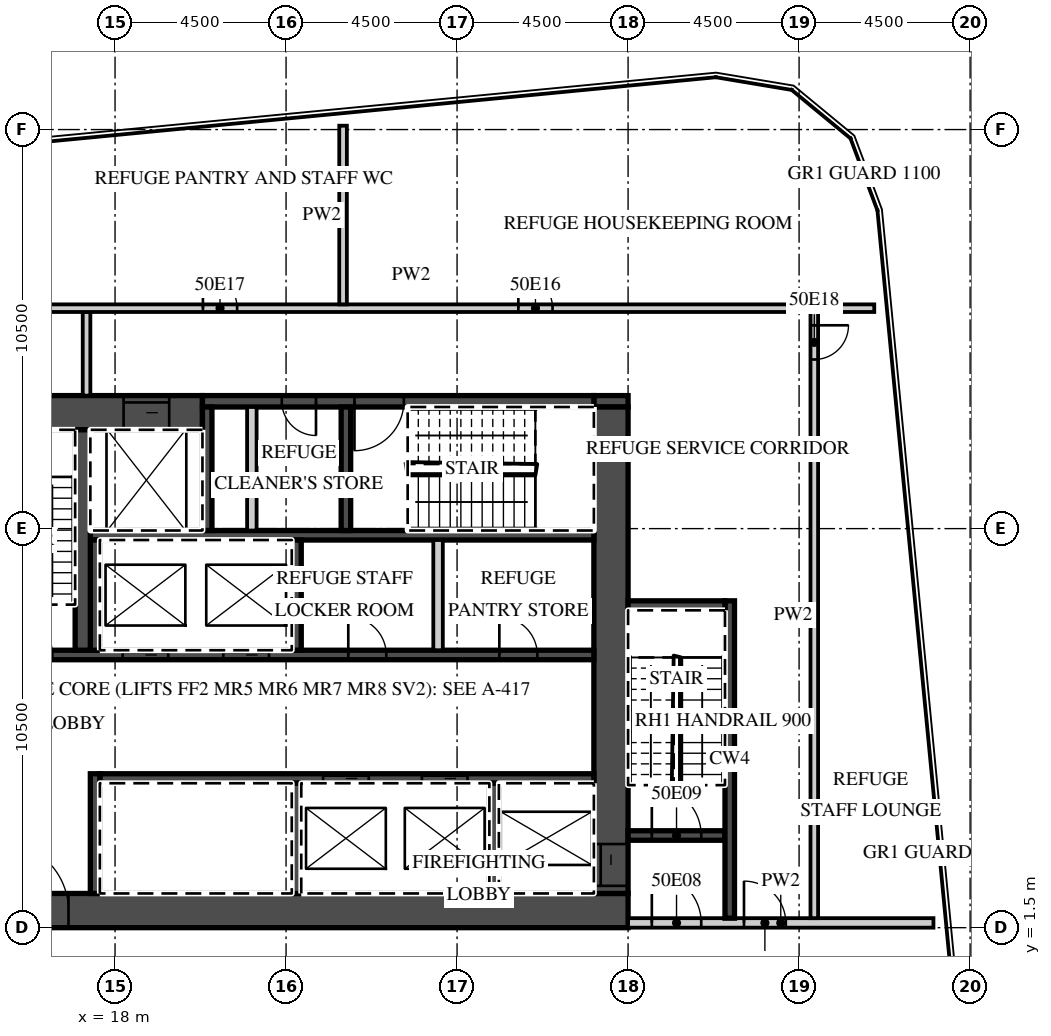
"""IFC4 building model, lengths in metres.
Left out: names, types, materials, properties, quantities, classifications, styles, units other than length and angle.
Written with IfcOpenShell. Run it as: python <this file> out.ifc"""

import sys

from ifc_helpers import new_model, si_unit, direction, frame, frame_2d, origin, place, context, subcontext, project, spatial, rectangle, extrude, element, fill, save


model = new_model("IFC4")
c1 = context("Model", 3, precision=1e-05, world=origin(), true_north=direction((0.0, 1.0)))
c2 = subcontext(c1, "Body", "Model", "MODEL_VIEW")
j1 = project(units=[si_unit("LENGTHUNIT", "METRE"), si_unit("PLANEANGLEUNIT", "RADIAN")], contexts=[c1])
p1 = place(None, origin())
s1 = spatial("IfcSite", under=j1, at=p1, CompositionType="ELEMENT")
p2 = place(p1, origin())
s2 = spatial("IfcBuilding", under=s1, at=p2, CompositionType="ELEMENT")
p3 = place(p2, frame((0.0, 0.0, 206.5)))
s3 = spatial("IfcBuildingStorey", under=s2, at=p3, CompositionType="ELEMENT", Elevation=206.5)
p4 = place(p3, frame((13.5, 1.95, 0.0), z_axis=(0.0, 0.0, 1.0), x_axis=(1.0, 0.0, 0.0)))
e1 = element("IfcWall", 1, at=p4, inside=s3, PredefinedType="SHEAR", context=c2, shape_type="SweptSolid", body=[
    extrude(rectangle(XDim=18.0, YDim=0.9, at=frame_2d((9.0, 0.0))), origin(), (0.0, 0.0, 1.0), 4.2),
])
p5 = place(p4, frame((1.475, 0.0, 0.0)))
e2 = element("IfcOpeningElement", 2, at=p5, cuts=e1, PredefinedType="OPENING", context=c2, shape_type="SweptSolid", body=[
    extrude(rectangle(XDim=1.8, YDim=2.1, at=frame_2d((0.9, 1.05))), frame((0.0, 0.46, 0.0), z_axis=(0.0, -1.0, 0.0), x_axis=(1.0, 0.0, 0.0)), (0.0, 0.0, 1.0), 0.92),
])
p6 = place(p3, frame((13.5, 15.05, 0.0), z_axis=(0.0, 0.0, 1.0), x_axis=(1.0, 0.0, 0.0)))
e3 = element("IfcWall", 3, at=p6, inside=s3, PredefinedType="SHEAR", context=c2, shape_type="SweptSolid", body=[
    extrude(rectangle(XDim=6.8, YDim=0.9, at=frame_2d((3.4, 0.0))), origin(), (0.0, 0.0, 1.0), 4.2),
])
p7 = place(p6, frame((4.725, 0.0, 0.0)))
e4 = element("IfcOpeningElement", 4, at=p7, cuts=e3, PredefinedType="OPENING", context=c2, shape_type="SweptSolid", body=[
    extrude(rectangle(XDim=1.2, YDim=2.1, at=frame_2d((0.6, 1.05))), frame((0.0, 0.46, 0.0), z_axis=(0.0, -1.0, 0.0), x_axis=(1.0, 0.0, 0.0)), (0.0, 0.0, 1.0), 0.92),
])
p8 = place(p3, frame((30.6, 15.35, 0.0), z_axis=(0.0, 0.0, 1.0), x_axis=(1.0, 0.0, 0.0)))
e5 = element("IfcWall", 5, at=p8, inside=s3, PredefinedType="SHEAR", context=c2, shape_type="SweptSolid", body=[
    extrude(rectangle(XDim=0.9, YDim=0.3, at=frame_2d((0.45, 0.0))), origin(), (0.0, 0.0, 1.0), 4.2),
])
p9 = place(p3, frame((20.3, 15.35, 0.0), z_axis=(0.0, 0.0, 1.0), x_axis=(1.0, 0.0, 0.0)))
e6 = element("IfcWall", 6, at=p9, inside=s3, PredefinedType="SHEAR", context=c2, shape_type="SweptSolid", body=[
    extrude(rectangle(XDim=10.3, YDim=0.3, at=frame_2d((5.15, 0.0))), origin(), (0.0, 0.0, 1.0), 4.2),
])
p10 = place(p9, frame((4.0, 0.0, 0.0)))
e7 = element("IfcOpeningElement", 7, at=p10, cuts=e6, PredefinedType="OPENING", context=c2, shape_type="SweptSolid", body=[
    extrude(rectangle(XDim=1.3, YDim=2.1, at=frame_2d((0.65, 1.05))), frame((0.0, 0.16, 0.0), z_axis=(0.0, -1.0, 0.0), x_axis=(1.0, 0.0, 0.0)), (0.0, 0.0, 1.0), 0.32),
])
p11 = place(p9, frame((2.087, 0.0, 0.0)))
e8 = element("IfcOpeningElement", 8, at=p11, cuts=e6, PredefinedType="OPENING", context=c2, shape_type="SweptSolid", body=[
    extrude(rectangle(XDim=0.9, YDim=2.1, at=frame_2d((0.45, 1.05))), frame((0.0, 0.16, 0.0), z_axis=(0.0, -1.0, 0.0), x_axis=(1.0, 0.0, 0.0)), (0.0, 0.0, 1.0), 0.32),
])
p12 = place(p3, frame((31.05, 2.4, 0.0), z_axis=(0.0, 0.0, 1.0), x_axis=(0.0, 1.0, 0.0)))
e9 = element("IfcWall", 9, at=p12, inside=s3, PredefinedType="SHEAR", context=c2, shape_type="SweptSolid", body=[
    extrude(rectangle(XDim=12.8, YDim=0.9, at=frame_2d((6.4, 0.0))), origin(), (0.0, 0.0, 1.0), 4.2),
])
p13 = place(p12, frame((0.2, 0.0, 0.0)))
e10 = element("IfcOpeningElement", 10, at=p13, cuts=e9, PredefinedType="OPENING", context=c2, shape_type="SweptSolid", body=[
    extrude(rectangle(XDim=1.1, YDim=2.1, at=frame_2d((0.55, 1.05))), frame((0.0, 0.46, 0.0), z_axis=(0.0, -1.0, 0.0), x_axis=(1.0, 0.0, 0.0)), (0.0, 0.0, 1.0), 0.92),
])
p14 = place(p3, frame((17.6, 5.425, 0.0), z_axis=(0.0, 0.0, 1.0), x_axis=(1.0, 0.0, 0.0)))
e11 = element("IfcWall", 11, at=p14, inside=s3, PredefinedType="SHEAR", context=c2, shape_type="SweptSolid", body=[
    extrude(rectangle(XDim=13.0, YDim=0.25, at=frame_2d((6.5, 0.0))), origin(), (0.0, 0.0, 1.0), 4.2),
])
p15 = place(p14, frame((8.475, 0.0, 0.0)))
e12 = element("IfcOpeningElement", 12, at=p15, cuts=e11, PredefinedType="OPENING", context=c2, shape_type="SweptSolid", body=[
    extrude(rectangle(XDim=1.2, YDim=2.1, at=frame_2d((0.6, 1.05))), frame((0.0, 0.135, 0.0), z_axis=(0.0, -1.0, 0.0), x_axis=(1.0, 0.0, 0.0)), (0.0, 0.0, 1.0), 0.27),
])
p16 = place(p14, frame((5.875, 0.0, 0.0)))
e13 = element("IfcOpeningElement", 13, at=p16, cuts=e11, PredefinedType="OPENING", context=c2, shape_type="SweptSolid", body=[
    extrude(rectangle(XDim=1.2, YDim=2.1, at=frame_2d((0.6, 1.05))), frame((0.0, 0.135, 0.0), z_axis=(0.0, -1.0, 0.0), x_axis=(1.0, 0.0, 0.0)), (0.0, 0.0, 1.0), 0.27),
])
p17 = place(p3, frame((17.475, 2.4, 0.0), z_axis=(0.0, 0.0, 1.0), x_axis=(0.0, 1.0, 0.0)))
e14 = element("IfcWall", 14, at=p17, inside=s3, PredefinedType="SHEAR", context=c2, shape_type="SweptSolid", body=[
    extrude(rectangle(XDim=3.15, YDim=0.25, at=frame_2d((1.575, 0.0))), origin(), (0.0, 0.0, 1.0), 4.2),
])
for number, where, z_axis, x_axis in (
    (15, (27.975, 2.4, 0.0), (0.0, 0.0, 1.0), (0.0, 1.0, 0.0)),
    (16, (22.775, 2.4, 0.0), (0.0, 0.0, 1.0), (0.0, 1.0, 0.0)),
):
    element("IfcWall", number, at=place(p3, frame(where, z_axis=z_axis, x_axis=x_axis)), inside=s3, PredefinedType="SHEAR", context=c2, shape_type="SweptSolid", body=[
        extrude(rectangle(XDim=2.9, YDim=0.25, at=frame_2d((1.45, 0.0))), origin(), (0.0, 0.0, 1.0), 4.2),
    ])
p18 = place(p3, frame((14.4, 8.675, 0.0), z_axis=(0.0, 0.0, 1.0), x_axis=(1.0, 0.0, 0.0)))
e17 = element("IfcWall", 17, at=p18, inside=s3, PredefinedType="SHEAR", context=c2, shape_type="SweptSolid", body=[
    extrude(rectangle(XDim=16.2, YDim=0.25, at=frame_2d((8.1, 0.0))), origin(), (0.0, 0.0, 1.0), 4.2),
])
p19 = place(p18, frame((6.45, 0.0, 0.0)))
e18 = element("IfcOpeningElement", 18, at=p19, cuts=e17, PredefinedType="OPENING", context=c2, shape_type="SweptSolid", body=[
    extrude(rectangle(XDim=1.2, YDim=2.1, at=frame_2d((0.6, 1.05))), frame((0.0, 0.135, 0.0), z_axis=(0.0, -1.0, 0.0), x_axis=(1.0, 0.0, 0.0)), (0.0, 0.0, 1.0), 0.27),
])
p20 = place(p18, frame((3.8, 0.0, 0.0)))
e19 = element("IfcOpeningElement", 19, at=p20, cuts=e17, PredefinedType="OPENING", context=c2, shape_type="SweptSolid", body=[
    extrude(rectangle(XDim=1.2, YDim=2.1, at=frame_2d((0.6, 1.05))), frame((0.0, 0.135, 0.0), z_axis=(0.0, -1.0, 0.0), x_axis=(1.0, 0.0, 0.0)), (0.0, 0.0, 1.0), 0.27),
])
p21 = place(p18, frame((0.65, 0.0, 0.0)))
e20 = element("IfcOpeningElement", 20, at=p21, cuts=e17, PredefinedType="OPENING", context=c2, shape_type="SweptSolid", body=[
    extrude(rectangle(XDim=1.3, YDim=2.1, at=frame_2d((0.65, 1.05))), frame((0.0, 0.135, 0.0), z_axis=(0.0, -1.0, 0.0), x_axis=(1.0, 0.0, 0.0)), (0.0, 0.0, 1.0), 0.27),
])
p22 = place(p18, frame((13.712, 0.0, 0.0)))
e21 = element("IfcOpeningElement", 21, at=p22, cuts=e17, PredefinedType="OPENING", context=c2, shape_type="SweptSolid", body=[
    extrude(rectangle(XDim=1.0, YDim=2.1, at=frame_2d((0.5, 1.05))), frame((0.0, 0.135, 0.0), z_axis=(0.0, -1.0, 0.0), x_axis=(1.0, 0.0, 0.0)), (0.0, 0.0, 1.0), 0.27),
])
p23 = place(p18, frame((9.738, 0.0, 0.0)))
e22 = element("IfcOpeningElement", 22, at=p23, cuts=e17, PredefinedType="OPENING", context=c2, shape_type="SweptSolid", body=[
    extrude(rectangle(XDim=1.0, YDim=2.1, at=frame_2d((0.5, 1.05))), frame((0.0, 0.135, 0.0), z_axis=(0.0, -1.0, 0.0), x_axis=(1.0, 0.0, 0.0)), (0.0, 0.0, 1.0), 0.27),
])
p24 = place(p3, frame((17.35, 11.825, 0.0), z_axis=(0.0, 0.0, 1.0), x_axis=(1.0, 0.0, 0.0)))
e23 = element("IfcWall", 23, at=p24, inside=s3, PredefinedType="SHEAR", context=c2, shape_type="SweptSolid", body=[
    extrude(rectangle(XDim=13.25, YDim=0.25, at=frame_2d((6.625, 0.0))), origin(), (0.0, 0.0, 1.0), 4.2),
])
for number, where, z_axis, x_axis in (
    (24, (17.475, 8.8, 0.0), (0.0, 0.0, 1.0), (0.0, 1.0, 0.0)),
    (25, (22.775, 8.8, 0.0), (0.0, 0.0, 1.0), (0.0, 1.0, 0.0)),
):
    element("IfcWall", number, at=place(p3, frame(where, z_axis=z_axis, x_axis=x_axis)), inside=s3, PredefinedType="SHEAR", context=c2, shape_type="SweptSolid", body=[
        extrude(rectangle(XDim=2.9, YDim=0.25, at=frame_2d((1.45, 0.0))), origin(), (0.0, 0.0, 1.0), 4.2),
    ])
p25 = place(p3, frame((26.5, 8.8, 0.0), z_axis=(0.0, 0.0, 1.0), x_axis=(0.0, 1.0, 0.0)))
e26 = element("IfcWall", 26, at=p25, inside=s3, PredefinedType="PARTITIONING", context=c2, shape_type="SweptSolid", body=[
    extrude(rectangle(XDim=2.9, YDim=0.25, at=frame_2d((1.45, 0.0))), origin(), (0.0, 0.0, 1.0), 4.2),
])
p26 = place(p3, frame((17.15, 8.8, 0.0), z_axis=(0.0, 0.0, 1.0), x_axis=(0.0, 1.0, 0.0)))
e27 = element("IfcWall", 27, at=p26, inside=s3, PredefinedType="SHEAR", context=c2, shape_type="SweptSolid", body=[
    extrude(rectangle(XDim=5.8, YDim=0.4, at=frame_2d((2.9, 0.0))), origin(), (0.0, 0.0, 1.0), 4.2),
])
for number, where, z_axis, x_axis in (
    (28, (20.425, 11.95, 0.0), (0.0, 0.0, 1.0), (0.0, 1.0, 0.0)),
    (29, (24.075, 11.95, 0.0), (0.0, 0.0, 1.0), (0.0, 1.0, 0.0)),
):
    element("IfcWall", number, at=place(p3, frame(where, z_axis=z_axis, x_axis=x_axis)), inside=s3, PredefinedType="SHEAR", context=c2, shape_type="SweptSolid", body=[
        extrude(rectangle(XDim=3.25, YDim=0.25, at=frame_2d((1.625, 0.0))), origin(), (0.0, 0.0, 1.0), 4.2),
    ])
p27 = place(p3, frame((21.6, 11.95, 0.0), z_axis=(0.0, 0.0, 1.0), x_axis=(0.0, 1.0, 0.0)))
e30 = element("IfcWall", 30, at=p27, inside=s3, PredefinedType="PARTITIONING", context=c2, shape_type="SweptSolid", body=[
    extrude(rectangle(XDim=3.25, YDim=0.25, at=frame_2d((1.625, 0.0))), origin(), (0.0, 0.0, 1.0), 4.2),
])
p28 = place(p3, frame((31.5, 1.625, 0.0), z_axis=(0.0, 0.0, 1.0), x_axis=(1.0, 0.0, 0.0)))
e31 = element("IfcWall", 31, at=p28, inside=s3, PredefinedType="PARTITIONING", context=c2, shape_type="SweptSolid", body=[
    extrude(rectangle(XDim=8.035, YDim=0.25, at=frame_2d((4.018, 0.0))), origin(), (0.0, 0.0, 1.0), 4.2),
])
p29 = place(p28, frame((0.625, 0.0, 0.0)))
e32 = element("IfcOpeningElement", 32, at=p29, cuts=e31, PredefinedType="OPENING", context=c2, shape_type="SweptSolid", body=[
    extrude(rectangle(XDim=1.3, YDim=2.1, at=frame_2d((0.65, 1.05))), frame((0.0, 0.135, 0.0), z_axis=(0.0, -1.0, 0.0), x_axis=(1.0, 0.0, 0.0)), (0.0, 0.0, 1.0), 0.27),
])
p30 = place(p28, frame((3.05, 0.0, 0.0)))
e33 = element("IfcOpeningElement", 33, at=p30, cuts=e31, PredefinedType="OPENING", context=c2, shape_type="SweptSolid", body=[
    extrude(rectangle(XDim=1.1, YDim=2.1, at=frame_2d((0.55, 1.05))), frame((0.0, 0.135, 0.0), z_axis=(0.0, -1.0, 0.0), x_axis=(1.0, 0.0, 0.0)), (0.0, 0.0, 1.0), 0.27),
])
p31 = place(p3, frame((31.5, 3.925, 0.0), z_axis=(0.0, 0.0, 1.0), x_axis=(1.0, 0.0, 0.0)))
e34 = element("IfcWall", 34, at=p31, inside=s3, PredefinedType="SHEAR", context=c2, shape_type="SweptSolid", body=[
    extrude(rectangle(XDim=2.55, YDim=0.25, at=frame_2d((1.275, 0.0))), origin(), (0.0, 0.0, 1.0), 4.2),
])
p32 = place(p31, frame((0.625, 0.0, 0.0)))
e35 = element("IfcOpeningElement", 35, at=p32, cuts=e34, PredefinedType="OPENING", context=c2, shape_type="SweptSolid", body=[
    extrude(rectangle(XDim=1.3, YDim=2.1, at=frame_2d((0.65, 1.05))), frame((0.0, 0.135, 0.0), z_axis=(0.0, -1.0, 0.0), x_axis=(1.0, 0.0, 0.0)), (0.0, 0.0, 1.0), 0.27),
])
p33 = place(p3, frame((34.175, 1.75, 0.0), z_axis=(0.0, 0.0, 1.0), x_axis=(0.0, 1.0, 0.0)))
e36 = element("IfcWall", 36, at=p33, inside=s3, PredefinedType="SHEAR", context=c2, shape_type="SweptSolid", body=[
    extrude(rectangle(XDim=8.35, YDim=0.25, at=frame_2d((4.175, 0.0))), origin(), (0.0, 0.0, 1.0), 4.2),
])
p34 = place(p3, frame((31.5, 9.975, 0.0), z_axis=(0.0, 0.0, 1.0), x_axis=(1.0, 0.0, 0.0)))
e37 = element("IfcWall", 37, at=p34, inside=s3, PredefinedType="SHEAR", context=c2, shape_type="SweptSolid", body=[
    extrude(rectangle(XDim=2.55, YDim=0.25, at=frame_2d((1.275, 0.0))), origin(), (0.0, 0.0, 1.0), 4.2),
])
p35 = place(p3, frame((17.25, 15.5, 0.0), z_axis=(0.0, 0.0, 1.0), x_axis=(0.0, 1.0, 0.0)))
e38 = element("IfcWall", 38, at=p35, inside=s3, PredefinedType="PARTITIONING", context=c2, shape_type="SweptSolid", body=[
    extrude(rectangle(XDim=2.2, YDim=0.2, at=frame_2d((1.1, 0.0))), origin(), (0.0, 0.0, 1.0), 4.2),
])
p36 = place(p3, frame((36.4, 1.75, 0.0), z_axis=(0.0, 0.0, 1.0), x_axis=(0.0, 1.0, 0.0)))
e39 = element("IfcWall", 39, at=p36, inside=s3, PredefinedType="PARTITIONING", context=c2, shape_type="SweptSolid", body=[
    extrude(rectangle(XDim=15.95, YDim=0.2, at=frame_2d((7.975, 0.0))), origin(), (0.0, 0.0, 1.0), 4.2),
])
p37 = place(p36, frame((14.7, 0.0, 0.0)))
e40 = element("IfcOpeningElement", 40, at=p37, cuts=e39, PredefinedType="OPENING", context=c2, shape_type="SweptSolid", body=[
    extrude(rectangle(XDim=0.9, YDim=2.1, at=frame_2d((0.45, 1.05))), frame((0.0, 0.11, 0.0), z_axis=(0.0, -1.0, 0.0), x_axis=(1.0, 0.0, 0.0)), (0.0, 0.0, 1.0), 0.22),
])
p38 = place(p3, frame((13.6, 17.8, 0.0), z_axis=(0.0, 0.0, 1.0), x_axis=(1.0, 0.0, 0.0)))
e41 = element("IfcWall", 41, at=p38, inside=s3, PredefinedType="PARTITIONING", context=c2, shape_type="SweptSolid", body=[
    extrude(rectangle(XDim=24.378, YDim=0.2, at=frame_2d((12.189, 0.0))), origin(), (0.0, 0.0, 1.0), 4.2),
])
p39 = place(p38, frame((15.012, 0.0, 0.0)))
e42 = element("IfcOpeningElement", 42, at=p39, cuts=e41, PredefinedType="OPENING", context=c2, shape_type="SweptSolid", body=[
    extrude(rectangle(XDim=0.9, YDim=2.1, at=frame_2d((0.45, 1.05))), frame((0.0, 0.11, 0.0), z_axis=(0.0, -1.0, 0.0), x_axis=(1.0, 0.0, 0.0)), (0.0, 0.0, 1.0), 0.22),
])
p40 = place(p38, frame((6.712, 0.0, 0.0)))
e43 = element("IfcOpeningElement", 43, at=p40, cuts=e41, PredefinedType="OPENING", context=c2, shape_type="SweptSolid", body=[
    extrude(rectangle(XDim=0.9, YDim=2.1, at=frame_2d((0.45, 1.05))), frame((0.0, 0.11, 0.0), z_axis=(0.0, -1.0, 0.0), x_axis=(1.0, 0.0, 0.0)), (0.0, 0.0, 1.0), 0.22),
])
p41 = place(p3, frame((24.0, 17.9, 0.0), z_axis=(0.0, 0.0, 1.0), x_axis=(0.0, 1.0, 0.0)))
e44 = element("IfcWall", 44, at=p41, inside=s3, PredefinedType="PARTITIONING", context=c2, shape_type="SweptSolid", body=[
    extrude(rectangle(XDim=4.701, YDim=0.2, at=frame_2d((2.351, 0.0))), origin(), (0.0, 0.0, 1.0), 4.2),
])
p42 = place(p19, origin())
e45 = element("IfcDoor", 45, at=p42, inside=s3, OperationType="SLIDING_TO_LEFT", PredefinedType="DOOR", context=c2, shape_type="SweptSolid", body=[
    extrude(rectangle(XDim=1.2, YDim=2.1, at=frame_2d((0.6, 1.05))), frame((0.0, 0.025, 0.0), z_axis=(0.0, -1.0, 0.0), x_axis=(1.0, 0.0, 0.0)), (0.0, 0.0, 1.0), 0.05),
])
fill(e18, e45)
p43 = place(p20, origin())
e46 = element("IfcDoor", 46, at=p43, inside=s3, OperationType="SLIDING_TO_RIGHT", PredefinedType="DOOR", context=c2, shape_type="SweptSolid", body=[
    extrude(rectangle(XDim=1.2, YDim=2.1, at=frame_2d((0.6, 1.05))), frame((0.0, 0.025, 0.0), z_axis=(0.0, -1.0, 0.0), x_axis=(1.0, 0.0, 0.0)), (0.0, 0.0, 1.0), 0.05),
])
fill(e19, e46)
p44 = place(p15, origin())
e47 = element("IfcDoor", 47, at=p44, inside=s3, OperationType="SLIDING_TO_LEFT", PredefinedType="DOOR", context=c2, shape_type="SweptSolid", body=[
    extrude(rectangle(XDim=1.2, YDim=2.1, at=frame_2d((0.6, 1.05))), frame((0.0, 0.025, 0.0), z_axis=(0.0, -1.0, 0.0), x_axis=(1.0, 0.0, 0.0)), (0.0, 0.0, 1.0), 0.05),
])
fill(e12, e47)
p45 = place(p16, origin())
e48 = element("IfcDoor", 48, at=p45, inside=s3, OperationType="SLIDING_TO_RIGHT", PredefinedType="DOOR", context=c2, shape_type="SweptSolid", body=[
    extrude(rectangle(XDim=1.2, YDim=2.1, at=frame_2d((0.6, 1.05))), frame((0.0, 0.025, 0.0), z_axis=(0.0, -1.0, 0.0), x_axis=(1.0, 0.0, 0.0)), (0.0, 0.0, 1.0), 0.05),
])
fill(e13, e48)
p46 = place(p7, origin())
e49 = element("IfcDoor", 49, at=p46, inside=s3, OperationType="SLIDING_TO_LEFT", PredefinedType="DOOR", context=c2, shape_type="SweptSolid", body=[
    extrude(rectangle(XDim=1.2, YDim=2.1, at=frame_2d((0.6, 1.05))), frame((0.0, 0.025, 0.0), z_axis=(0.0, -1.0, 0.0), x_axis=(1.0, 0.0, 0.0)), (0.0, 0.0, 1.0), 0.05),
])
fill(e4, e49)
p47 = place(p13, origin())
e50 = element("IfcDoor", 50, at=p47, inside=s3, OperationType="SLIDING_TO_LEFT", PredefinedType="DOOR", context=c2, shape_type="SweptSolid", body=[
    extrude(rectangle(XDim=1.1, YDim=2.1, at=frame_2d((0.55, 1.05))), frame((0.0, 0.025, 0.0), z_axis=(0.0, -1.0, 0.0), x_axis=(1.0, 0.0, 0.0)), (0.0, 0.0, 1.0), 0.05),
])
fill(e10, e50)
p48 = place(p5, origin())
e51 = element("IfcDoor", 51, at=p48, inside=s3, OperationType="DOUBLE_DOOR_DOUBLE_SWING", PredefinedType="DOOR", context=c2, shape_type="SweptSolid", body=[
    extrude(rectangle(XDim=1.8, YDim=2.1, at=frame_2d((0.9, 1.05))), frame((0.0, 0.025, 0.0), z_axis=(0.0, -1.0, 0.0), x_axis=(1.0, 0.0, 0.0)), (0.0, 0.0, 1.0), 0.05),
])
fill(e2, e51)
p49 = place(p29, origin())
e52 = element("IfcDoor", 52, at=p49, inside=s3, OperationType="SINGLE_SWING_LEFT", PredefinedType="DOOR", context=c2, shape_type="SweptSolid", body=[
    extrude(rectangle(XDim=1.3, YDim=2.1, at=frame_2d((0.65, 1.05))), frame((0.0, 0.025, 0.0), z_axis=(0.0, -1.0, 0.0), x_axis=(1.0, 0.0, 0.0)), (0.0, 0.0, 1.0), 0.05),
])
fill(e32, e52)
p50 = place(p32, origin())
e53 = element("IfcDoor", 53, at=p50, inside=s3, OperationType="SINGLE_SWING_LEFT", PredefinedType="DOOR", context=c2, shape_type="SweptSolid", body=[
    extrude(rectangle(XDim=1.3, YDim=2.1, at=frame_2d((0.65, 1.05))), frame((0.0, 0.025, 0.0), z_axis=(0.0, -1.0, 0.0), x_axis=(1.0, 0.0, 0.0)), (0.0, 0.0, 1.0), 0.05),
])
fill(e35, e53)
p51 = place(p30, origin())
e54 = element("IfcDoor", 54, at=p51, inside=s3, OperationType="SINGLE_SWING_LEFT", PredefinedType="DOOR", context=c2, shape_type="SweptSolid", body=[
    extrude(rectangle(XDim=1.1, YDim=2.1, at=frame_2d((0.55, 1.05))), frame((0.0, 0.025, 0.0), z_axis=(0.0, -1.0, 0.0), x_axis=(1.0, 0.0, 0.0)), (0.0, 0.0, 1.0), 0.05),
])
fill(e33, e54)
p52 = place(p10, origin())
e55 = element("IfcDoor", 55, at=p52, inside=s3, OperationType="SINGLE_SWING_LEFT", PredefinedType="DOOR", context=c2, shape_type="SweptSolid", body=[
    extrude(rectangle(XDim=1.3, YDim=2.1, at=frame_2d((0.65, 1.05))), frame((0.0, 0.025, 0.0), z_axis=(0.0, -1.0, 0.0), x_axis=(1.0, 0.0, 0.0)), (0.0, 0.0, 1.0), 0.05),
])
fill(e7, e55)
p53 = place(p11, origin())
e56 = element("IfcDoor", 56, at=p53, inside=s3, OperationType="SINGLE_SWING_RIGHT", PredefinedType="DOOR", context=c2, shape_type="SweptSolid", body=[
    extrude(rectangle(XDim=0.9, YDim=2.1, at=frame_2d((0.45, 1.05))), frame((0.0, 0.025, 0.0), z_axis=(0.0, -1.0, 0.0), x_axis=(1.0, 0.0, 0.0)), (0.0, 0.0, 1.0), 0.05),
])
fill(e8, e56)
p54 = place(p22, origin())
e57 = element("IfcDoor", 57, at=p54, inside=s3, OperationType="SINGLE_SWING_LEFT", PredefinedType="DOOR", context=c2, shape_type="SweptSolid", body=[
    extrude(rectangle(XDim=1.0, YDim=2.1, at=frame_2d((0.5, 1.05))), frame((0.0, 0.025, 0.0), z_axis=(0.0, -1.0, 0.0), x_axis=(1.0, 0.0, 0.0)), (0.0, 0.0, 1.0), 0.05),
])
fill(e21, e57)
p55 = place(p23, origin())
e58 = element("IfcDoor", 58, at=p55, inside=s3, OperationType="SINGLE_SWING_LEFT", PredefinedType="DOOR", context=c2, shape_type="SweptSolid", body=[
    extrude(rectangle(XDim=1.0, YDim=2.1, at=frame_2d((0.5, 1.05))), frame((0.0, 0.025, 0.0), z_axis=(0.0, -1.0, 0.0), x_axis=(1.0, 0.0, 0.0)), (0.0, 0.0, 1.0), 0.05),
])
fill(e22, e58)
p56 = place(p39, origin())
e59 = element("IfcDoor", 59, at=p56, inside=s3, OperationType="SINGLE_SWING_LEFT", PredefinedType="DOOR", context=c2, shape_type="SweptSolid", body=[
    extrude(rectangle(XDim=0.9, YDim=2.1, at=frame_2d((0.45, 1.05))), frame((0.0, 0.025, 0.0), z_axis=(0.0, -1.0, 0.0), x_axis=(1.0, 0.0, 0.0)), (0.0, 0.0, 1.0), 0.05),
])
fill(e42, e59)
p57 = place(p40, origin())
e60 = element("IfcDoor", 60, at=p57, inside=s3, OperationType="SINGLE_SWING_LEFT", PredefinedType="DOOR", context=c2, shape_type="SweptSolid", body=[
    extrude(rectangle(XDim=0.9, YDim=2.1, at=frame_2d((0.45, 1.05))), frame((0.0, 0.025, 0.0), z_axis=(0.0, -1.0, 0.0), x_axis=(1.0, 0.0, 0.0)), (0.0, 0.0, 1.0), 0.05),
])
fill(e43, e60)
p58 = place(p37, origin())
e61 = element("IfcDoor", 61, at=p58, inside=s3, OperationType="SINGLE_SWING_RIGHT", PredefinedType="DOOR", context=c2, shape_type="SweptSolid", body=[
    extrude(rectangle(XDim=0.9, YDim=2.1, at=frame_2d((0.45, 1.05))), frame((0.0, 0.025, 0.0), z_axis=(0.0, -1.0, 0.0), x_axis=(1.0, 0.0, 0.0)), (0.0, 0.0, 1.0), 0.05),
])
fill(e40, e61)
save(model, sys.argv[1])
